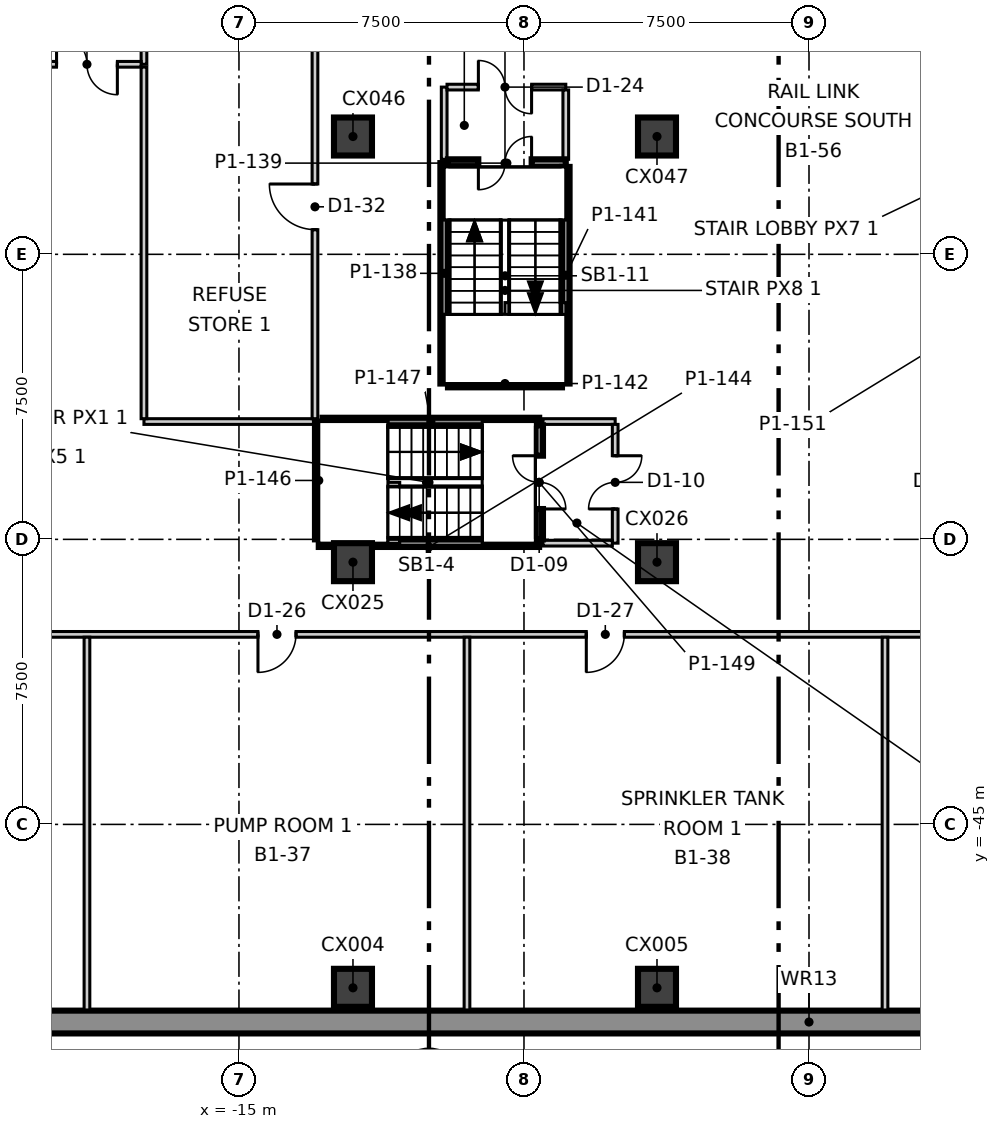
"""IFC4 building model, lengths in metres.
Left out: names, types, materials, properties, quantities, classifications, styles, units other than length and angle.
Written with IfcOpenShell. Run it as: python <this file> out.ifc"""

import sys

from ifc_helpers import new_model, si_unit, direction, frame, frame_2d, origin, origin_2d, place, context, subcontext, project, spatial, rectangle, extrude, element, fill, save


model = new_model("IFC4")
c1 = context("Model", 3, precision=1e-05, world=origin(), true_north=direction((0.0, 1.0)))
c2 = subcontext(c1, "Body", "Model", "MODEL_VIEW")
j1 = project(units=[si_unit("LENGTHUNIT", "METRE"), si_unit("PLANEANGLEUNIT", "RADIAN")], contexts=[c1])
p1 = place(None, origin())
s1 = spatial("IfcSite", under=j1, at=p1, CompositionType="ELEMENT")
p2 = place(p1, origin())
s2 = spatial("IfcBuilding", under=s1, at=p2, CompositionType="ELEMENT")
p3 = place(p2, frame((0.0, 0.0, -5.5)))
s3 = spatial("IfcBuildingStorey", under=s2, at=p3, CompositionType="ELEMENT", Elevation=-5.5)
p4 = place(p3, frame((-39.7, -50.2, -0.4), z_axis=(0.0, 0.0, 1.0), x_axis=(1.0, 0.0, 0.0)))
e1 = element("IfcWall", 1, at=p4, inside=s3, PredefinedType="SOLIDWALL", context=c2, shape_type="SweptSolid", body=[
    extrude(rectangle(XDim=79.4, YDim=0.6, at=frame_2d((39.7, 0.0))), origin(), (0.0, 0.0, 1.0), 5.5),
])
for number, where, z_axis, x_axis in (
    (2, (-12.0, -49.3, -0.4), (0.0, 0.0, 1.0), (1.0, 0.0, 0.0)),
    (3, (-4.0, -49.3, -0.4), (0.0, 0.0, 1.0), (1.0, 0.0, 0.0)),
    (4, (-12.0, -38.1, -0.4), (0.0, 0.0, 1.0), (1.0, 0.0, 0.0)),
    (5, (-4.0, -38.1, -0.4), (0.0, 0.0, 1.0), (1.0, 0.0, 0.0)),
    (6, (-12.0, -26.9, -0.4), (0.0, 0.0, 1.0), (1.0, 0.0, 0.0)),
    (7, (-4.0, -26.9, -0.4), (0.0, 0.0, 1.0), (1.0, 0.0, 0.0)),
):
    element("IfcColumn", number, at=place(p3, frame(where, z_axis=z_axis, x_axis=x_axis)), inside=s3, PredefinedType="COLUMN", context=c2, shape_type="SweptSolid", body=[
        extrude(rectangle(XDim=1.0, YDim=1.0, at=origin_2d()), origin(), (0.0, 0.0, 1.0), 5.5),
    ])
p5 = place(p3, frame((-39.4, -40.0, 0.0), z_axis=(0.0, 0.0, 1.0), x_axis=(1.0, 0.0, 0.0)))
e8 = element("IfcWall", 8, at=p5, inside=s3, PredefinedType="PARTITIONING", context=c2, shape_type="SweptSolid", body=[
    extrude(rectangle(XDim=78.8, YDim=0.15, at=frame_2d((39.4, 0.0))), origin(), (0.0, 0.0, 1.0), 5.1),
])
p6 = place(p5, frame((9.6, 0.0, 0.0)))
e9 = element("IfcOpeningElement", 9, at=p6, cuts=e8, PredefinedType="OPENING", context=c2, shape_type="SweptSolid", body=[
    extrude(rectangle(XDim=1.2, YDim=2.1, at=frame_2d((0.6, 1.05))), frame((0.0, 0.085, 0.0), z_axis=(0.0, -1.0, 0.0), x_axis=(1.0, 0.0, 0.0)), (0.0, 0.0, 1.0), 0.17),
])
p7 = place(p5, frame((24.9, 0.0, 0.0)))
e10 = element("IfcOpeningElement", 10, at=p7, cuts=e8, PredefinedType="OPENING", context=c2, shape_type="SweptSolid", body=[
    extrude(rectangle(XDim=1.0, YDim=2.1, at=frame_2d((0.5, 1.05))), frame((0.0, 0.085, 0.0), z_axis=(0.0, -1.0, 0.0), x_axis=(1.0, 0.0, 0.0)), (0.0, 0.0, 1.0), 0.17),
])
p8 = place(p5, frame((33.54, 0.0, 0.0)))
e11 = element("IfcOpeningElement", 11, at=p8, cuts=e8, PredefinedType="OPENING", context=c2, shape_type="SweptSolid", body=[
    extrude(rectangle(XDim=1.0, YDim=2.1, at=frame_2d((0.5, 1.05))), frame((0.0, 0.085, 0.0), z_axis=(0.0, -1.0, 0.0), x_axis=(1.0, 0.0, 0.0)), (0.0, 0.0, 1.0), 0.17),
])
p9 = place(p5, frame((44.4, 0.0, 0.0)))
e12 = element("IfcOpeningElement", 12, at=p9, cuts=e8, PredefinedType="OPENING", context=c2, shape_type="SweptSolid", body=[
    extrude(rectangle(XDim=1.0, YDim=2.1, at=frame_2d((0.5, 1.05))), frame((0.0, 0.085, 0.0), z_axis=(0.0, -1.0, 0.0), x_axis=(1.0, 0.0, 0.0)), (0.0, 0.0, 1.0), 0.17),
])
p10 = place(p5, frame((53.9, 0.0, 0.0)))
e13 = element("IfcOpeningElement", 13, at=p10, cuts=e8, PredefinedType="OPENING", context=c2, shape_type="SweptSolid", body=[
    extrude(rectangle(XDim=1.0, YDim=2.1, at=frame_2d((0.5, 1.05))), frame((0.0, 0.085, 0.0), z_axis=(0.0, -1.0, 0.0), x_axis=(1.0, 0.0, 0.0)), (0.0, 0.0, 1.0), 0.17),
])
p11 = place(p5, frame((65.7, 0.0, 0.0)))
e14 = element("IfcOpeningElement", 14, at=p11, cuts=e8, PredefinedType="OPENING", context=c2, shape_type="SweptSolid", body=[
    extrude(rectangle(XDim=1.2, YDim=2.1, at=frame_2d((0.6, 1.05))), frame((0.0, 0.085, 0.0), z_axis=(0.0, -1.0, 0.0), x_axis=(1.0, 0.0, 0.0)), (0.0, 0.0, 1.0), 0.17),
])
p12 = place(p3, frame((-19.0, -49.9, 0.0), z_axis=(0.0, 0.0, 1.0), x_axis=(0.0, 1.0, 0.0)))
e15 = element("IfcWall", 15, at=p12, inside=s3, PredefinedType="PARTITIONING", context=c2, shape_type="SweptSolid", body=[
    extrude(rectangle(XDim=9.825, YDim=0.15, at=frame_2d((4.913, 0.0))), origin(), (0.0, 0.0, 1.0), 5.1),
])
p13 = place(p3, frame((-9.6, -27.5, 0.0), z_axis=(0.0, 0.0, 1.0), x_axis=(0.0, 1.0, 0.0)))
e16 = element("IfcWall", 16, at=p13, inside=s3, PredefinedType="PARTITIONING", context=c2, shape_type="SweptSolid", body=[
    extrude(rectangle(XDim=1.9, YDim=0.15, at=frame_2d((0.95, 0.0))), origin(), (0.0, 0.0, 1.0), 5.1),
])
p14 = place(p3, frame((-9.525, -25.6, 0.0), z_axis=(0.0, 0.0, 1.0), x_axis=(1.0, 0.0, 0.0)))
e17 = element("IfcWall", 17, at=p14, inside=s3, PredefinedType="PARTITIONING", context=c2, shape_type="SweptSolid", body=[
    extrude(rectangle(XDim=3.125, YDim=0.15, at=frame_2d((1.562, 0.0))), origin(), (0.0, 0.0, 1.0), 5.1),
])
p15 = place(p14, frame((0.825, 0.0, 0.0)))
e18 = element("IfcOpeningElement", 18, at=p15, cuts=e17, PredefinedType="OPENING", context=c2, shape_type="SweptSolid", body=[
    extrude(rectangle(XDim=1.4, YDim=2.1, at=frame_2d((0.7, 1.05))), frame((0.0, 0.085, 0.0), z_axis=(0.0, -1.0, 0.0), x_axis=(1.0, 0.0, 0.0)), (0.0, 0.0, 1.0), 0.17),
])
p16 = place(p3, frame((-6.4, -27.5, 0.0), z_axis=(0.0, 0.0, 1.0), x_axis=(0.0, 1.0, 0.0)))
e19 = element("IfcWall", 19, at=p16, inside=s3, PredefinedType="PARTITIONING", context=c2, shape_type="SweptSolid", body=[
    extrude(rectangle(XDim=1.825, YDim=0.15, at=frame_2d((0.913, 0.0))), origin(), (0.0, 0.0, 1.0), 5.1),
])
p17 = place(p3, frame((-9.0, -49.9, 0.0), z_axis=(0.0, 0.0, 1.0), x_axis=(0.0, 1.0, 0.0)))
e20 = element("IfcWall", 20, at=p17, inside=s3, PredefinedType="PARTITIONING", context=c2, shape_type="SweptSolid", body=[
    extrude(rectangle(XDim=9.825, YDim=0.15, at=frame_2d((4.913, 0.0))), origin(), (0.0, 0.0, 1.0), 5.1),
])
p18 = place(p3, frame((-7.0, -34.4, 0.0), z_axis=(0.0, 0.0, 1.0), x_axis=(1.0, 0.0, 0.0)))
e21 = element("IfcWall", 21, at=p18, inside=s3, PredefinedType="PARTITIONING", context=c2, shape_type="SweptSolid", body=[
    extrude(rectangle(XDim=1.9, YDim=0.15, at=frame_2d((0.95, 0.0))), origin(), (0.0, 0.0, 1.0), 5.1),
])
p19 = place(p3, frame((-5.1, -37.6, 0.0), z_axis=(0.0, 0.0, 1.0), x_axis=(0.0, 1.0, 0.0)))
e22 = element("IfcWall", 22, at=p19, inside=s3, PredefinedType="PARTITIONING", context=c2, shape_type="SweptSolid", body=[
    extrude(rectangle(XDim=3.125, YDim=0.15, at=frame_2d((1.562, 0.0))), origin(), (0.0, 0.0, 1.0), 5.1),
])
p20 = place(p19, frame((0.9, 0.0, 0.0)))
e23 = element("IfcOpeningElement", 23, at=p20, cuts=e22, PredefinedType="OPENING", context=c2, shape_type="SweptSolid", body=[
    extrude(rectangle(XDim=1.4, YDim=2.1, at=frame_2d((0.7, 1.05))), frame((0.0, 0.085, 0.0), z_axis=(0.0, -1.0, 0.0), x_axis=(1.0, 0.0, 0.0)), (0.0, 0.0, 1.0), 0.17),
])
p21 = place(p3, frame((-7.0, -37.6, 0.0), z_axis=(0.0, 0.0, 1.0), x_axis=(1.0, 0.0, 0.0)))
e24 = element("IfcWall", 24, at=p21, inside=s3, PredefinedType="PARTITIONING", context=c2, shape_type="SweptSolid", body=[
    extrude(rectangle(XDim=1.825, YDim=0.15, at=frame_2d((0.913, 0.0))), origin(), (0.0, 0.0, 1.0), 5.1),
])
p22 = place(p3, frame((2.0, -49.9, 0.0), z_axis=(0.0, 0.0, 1.0), x_axis=(0.0, 1.0, 0.0)))
e25 = element("IfcWall", 25, at=p22, inside=s3, PredefinedType="PARTITIONING", context=c2, shape_type="SweptSolid", body=[
    extrude(rectangle(XDim=9.825, YDim=0.15, at=frame_2d((4.913, 0.0))), origin(), (0.0, 0.0, 1.0), 5.1),
])
p23 = place(p3, frame((-17.5, -25.0, 0.0), z_axis=(0.0, 0.0, 1.0), x_axis=(0.0, 1.0, 0.0)))
e26 = element("IfcWall", 26, at=p23, inside=s3, PredefinedType="PARTITIONING", context=c2, shape_type="SweptSolid", body=[
    extrude(rectangle(XDim=4.925, YDim=0.15, at=frame_2d((2.462, 0.0))), origin(), (0.0, 0.0, 1.0), 5.1),
])
p24 = place(p3, frame((-20.5, -25.0, 0.0), z_axis=(0.0, 0.0, 1.0), x_axis=(1.0, 0.0, 0.0)))
e27 = element("IfcWall", 27, at=p24, inside=s3, PredefinedType="PARTITIONING", context=c2, shape_type="SweptSolid", body=[
    extrude(rectangle(XDim=2.925, YDim=0.15, at=frame_2d((1.462, 0.0))), origin(), (0.0, 0.0, 1.0), 5.1),
])
p25 = place(p24, frame((0.7, 0.0, 0.0)))
e28 = element("IfcOpeningElement", 28, at=p25, cuts=e27, PredefinedType="OPENING", context=c2, shape_type="SweptSolid", body=[
    extrude(rectangle(XDim=1.6, YDim=2.1, at=frame_2d((0.8, 1.05))), frame((0.0, 0.085, 0.0), z_axis=(0.0, -1.0, 0.0), x_axis=(1.0, 0.0, 0.0)), (0.0, 0.0, 1.0), 0.17),
])
p26 = place(p3, frame((-17.5, -34.4, 0.0), z_axis=(0.0, 0.0, 1.0), x_axis=(1.0, 0.0, 0.0)))
e29 = element("IfcWall", 29, at=p26, inside=s3, PredefinedType="PARTITIONING", context=c2, shape_type="SweptSolid", body=[
    extrude(rectangle(XDim=4.5, YDim=0.15, at=frame_2d((2.25, 0.0))), origin(), (0.0, 0.0, 1.0), 5.1),
])
p27 = place(p3, frame((-13.0, -34.325, 0.0), z_axis=(0.0, 0.0, 1.0), x_axis=(0.0, 1.0, 0.0)))
e30 = element("IfcWall", 30, at=p27, inside=s3, PredefinedType="PARTITIONING", context=c2, shape_type="SweptSolid", body=[
    extrude(rectangle(XDim=11.15, YDim=0.15, at=frame_2d((5.575, 0.0))), origin(), (0.0, 0.0, 1.0), 5.1),
])
p28 = place(p27, frame((4.975, 0.0, 0.0)))
e31 = element("IfcOpeningElement", 31, at=p28, cuts=e30, PredefinedType="OPENING", context=c2, shape_type="SweptSolid", body=[
    extrude(rectangle(XDim=1.2, YDim=2.1, at=frame_2d((0.6, 1.05))), frame((0.0, 0.085, 0.0), z_axis=(0.0, -1.0, 0.0), x_axis=(1.0, 0.0, 0.0)), (0.0, 0.0, 1.0), 0.17),
])
p29 = place(p3, frame((-17.5, -34.325, 0.0), z_axis=(0.0, 0.0, 1.0), x_axis=(0.0, 1.0, 0.0)))
e32 = element("IfcWall", 32, at=p29, inside=s3, PredefinedType="PARTITIONING", context=c2, shape_type="SweptSolid", body=[
    extrude(rectangle(XDim=9.252, YDim=0.15, at=frame_2d((4.626, 0.0))), origin(), (0.0, 0.0, 1.0), 5.1),
])
p30 = place(p3, frame((-9.6, -33.4, 0.0), z_axis=(0.0, 0.0, 1.0), x_axis=(0.0, 1.0, 0.0)))
e33 = element("IfcWall", 33, at=p30, inside=s3, PredefinedType="SOLIDWALL", context=c2, shape_type="SweptSolid", body=[
    extrude(rectangle(XDim=5.8, YDim=0.2, at=frame_2d((2.9, 0.0))), origin(), (0.0, 0.0, 1.0), 5.1),
])
p31 = place(p3, frame((-9.5, -27.6, 0.0), z_axis=(0.0, 0.0, 1.0), x_axis=(1.0, 0.0, 0.0)))
e34 = element("IfcWall", 34, at=p31, inside=s3, PredefinedType="SOLIDWALL", context=c2, shape_type="SweptSolid", body=[
    extrude(rectangle(XDim=3.1, YDim=0.2, at=frame_2d((1.55, 0.0))), origin(), (0.0, 0.0, 1.0), 5.1),
])
p32 = place(p31, frame((0.8, 0.0, 0.0)))
e35 = element("IfcOpeningElement", 35, at=p32, cuts=e34, PredefinedType="OPENING", context=c2, shape_type="SweptSolid", body=[
    extrude(rectangle(XDim=1.4, YDim=2.1, at=frame_2d((0.7, 1.05))), frame((0.0, 0.11, 0.0), z_axis=(0.0, -1.0, 0.0), x_axis=(1.0, 0.0, 0.0)), (0.0, 0.0, 1.0), 0.22),
])
p33 = place(p3, frame((-6.4, -33.4, 0.0), z_axis=(0.0, 0.0, 1.0), x_axis=(0.0, 1.0, 0.0)))
e36 = element("IfcWall", 36, at=p33, inside=s3, PredefinedType="SOLIDWALL", context=c2, shape_type="SweptSolid", body=[
    extrude(rectangle(XDim=5.7, YDim=0.2, at=frame_2d((2.85, 0.0))), origin(), (0.0, 0.0, 1.0), 5.1),
])
p34 = place(p3, frame((-9.5, -33.4, 0.0), z_axis=(0.0, 0.0, 1.0), x_axis=(1.0, 0.0, 0.0)))
e37 = element("IfcWall", 37, at=p34, inside=s3, PredefinedType="SOLIDWALL", context=c2, shape_type="SweptSolid", body=[
    extrude(rectangle(XDim=3.0, YDim=0.2, at=frame_2d((1.5, 0.0))), origin(), (0.0, 0.0, 1.0), 5.1),
])
p35 = place(p3, frame((-12.9, -37.6, 0.0), z_axis=(0.0, 0.0, 1.0), x_axis=(1.0, 0.0, 0.0)))
e38 = element("IfcWall", 38, at=p35, inside=s3, PredefinedType="SOLIDWALL", context=c2, shape_type="SweptSolid", body=[
    extrude(rectangle(XDim=5.798, YDim=0.2, at=frame_2d((2.899, 0.0))), origin(), (0.0, 0.0, 1.0), 5.1),
])
p36 = place(p3, frame((-12.9, -37.5, 0.0), z_axis=(0.0, 0.0, 1.0), x_axis=(0.0, 1.0, 0.0)))
e39 = element("IfcWall", 39, at=p36, inside=s3, PredefinedType="SOLIDWALL", context=c2, shape_type="SweptSolid", body=[
    extrude(rectangle(XDim=3.1, YDim=0.2, at=frame_2d((1.55, 0.0))), origin(), (0.0, 0.0, 1.0), 5.1),
])
p37 = place(p3, frame((-12.8, -34.4, 0.0), z_axis=(0.0, 0.0, 1.0), x_axis=(1.0, 0.0, 0.0)))
e40 = element("IfcWall", 40, at=p37, inside=s3, PredefinedType="SOLIDWALL", context=c2, shape_type="SweptSolid", body=[
    extrude(rectangle(XDim=5.7, YDim=0.2, at=frame_2d((2.85, 0.0))), origin(), (0.0, 0.0, 1.0), 5.1),
])
p38 = place(p3, frame((-7.1, -37.5, 0.0), z_axis=(0.0, 0.0, 1.0), x_axis=(0.0, 1.0, 0.0)))
e41 = element("IfcWall", 41, at=p38, inside=s3, PredefinedType="SOLIDWALL", context=c2, shape_type="SweptSolid", body=[
    extrude(rectangle(XDim=3.0, YDim=0.2, at=frame_2d((1.5, 0.0))), origin(), (0.0, 0.0, 1.0), 5.1),
])
p39 = place(p38, frame((0.8, 0.0, 0.0)))
e42 = element("IfcOpeningElement", 42, at=p39, cuts=e41, PredefinedType="OPENING", context=c2, shape_type="SweptSolid", body=[
    extrude(rectangle(XDim=1.4, YDim=2.1, at=frame_2d((0.7, 1.05))), frame((0.0, 0.11, 0.0), z_axis=(0.0, -1.0, 0.0), x_axis=(1.0, 0.0, 0.0)), (0.0, 0.0, 1.0), 0.22),
])
p40 = place(p25, origin())
e43 = element("IfcDoor", 43, at=p40, inside=s3, OperationType="DOUBLE_DOOR_SINGLE_SWING", PredefinedType="DOOR", context=c2, shape_type="SweptSolid", body=[
    extrude(rectangle(XDim=1.6, YDim=2.1, at=frame_2d((0.8, 1.05))), frame((0.0, 0.025, 0.0), z_axis=(0.0, -1.0, 0.0), x_axis=(1.0, 0.0, 0.0)), (0.0, 0.0, 1.0), 0.05),
])
fill(e28, e43)
p41 = place(p39, origin())
e44 = element("IfcDoor", 44, at=p41, inside=s3, OperationType="DOUBLE_DOOR_SINGLE_SWING", PredefinedType="DOOR", context=c2, shape_type="SweptSolid", body=[
    extrude(rectangle(XDim=1.4, YDim=2.1, at=frame_2d((0.7, 1.05))), frame((0.0, 0.025, 0.0), z_axis=(0.0, -1.0, 0.0), x_axis=(1.0, 0.0, 0.0)), (0.0, 0.0, 1.0), 0.05),
])
fill(e42, e44)
p42 = place(p20, origin())
e45 = element("IfcDoor", 45, at=p42, inside=s3, OperationType="DOUBLE_DOOR_SINGLE_SWING", PredefinedType="DOOR", context=c2, shape_type="SweptSolid", body=[
    extrude(rectangle(XDim=1.4, YDim=2.1, at=frame_2d((0.7, 1.05))), frame((0.0, 0.025, 0.0), z_axis=(0.0, -1.0, 0.0), x_axis=(1.0, 0.0, 0.0)), (0.0, 0.0, 1.0), 0.05),
])
fill(e23, e45)
p43 = place(p32, origin())
e46 = element("IfcDoor", 46, at=p43, inside=s3, OperationType="DOUBLE_DOOR_SINGLE_SWING", PredefinedType="DOOR", context=c2, shape_type="SweptSolid", body=[
    extrude(rectangle(XDim=1.4, YDim=2.1, at=frame_2d((0.7, 1.05))), frame((0.0, 0.025, 0.0), z_axis=(0.0, -1.0, 0.0), x_axis=(1.0, 0.0, 0.0)), (0.0, 0.0, 1.0), 0.05),
])
fill(e35, e46)
p44 = place(p15, origin())
e47 = element("IfcDoor", 47, at=p44, inside=s3, OperationType="DOUBLE_DOOR_SINGLE_SWING", PredefinedType="DOOR", context=c2, shape_type="SweptSolid", body=[
    extrude(rectangle(XDim=1.4, YDim=2.1, at=frame_2d((0.7, 1.05))), frame((0.0, 0.025, 0.0), z_axis=(0.0, -1.0, 0.0), x_axis=(1.0, 0.0, 0.0)), (0.0, 0.0, 1.0), 0.05),
])
fill(e18, e47)
p45 = place(p7, origin())
e48 = element("IfcDoor", 48, at=p45, inside=s3, OperationType="SINGLE_SWING_LEFT", PredefinedType="DOOR", context=c2, shape_type="SweptSolid", body=[
    extrude(rectangle(XDim=1.0, YDim=2.1, at=frame_2d((0.5, 1.05))), frame((0.0, 0.025, 0.0), z_axis=(0.0, -1.0, 0.0), x_axis=(1.0, 0.0, 0.0)), (0.0, 0.0, 1.0), 0.05),
])
fill(e10, e48)
p46 = place(p8, origin())
e49 = element("IfcDoor", 49, at=p46, inside=s3, OperationType="SINGLE_SWING_LEFT", PredefinedType="DOOR", context=c2, shape_type="SweptSolid", body=[
    extrude(rectangle(XDim=1.0, YDim=2.1, at=frame_2d((0.5, 1.05))), frame((0.0, 0.025, 0.0), z_axis=(0.0, -1.0, 0.0), x_axis=(1.0, 0.0, 0.0)), (0.0, 0.0, 1.0), 0.05),
])
fill(e11, e49)
p47 = place(p28, origin())
e50 = element("IfcDoor", 50, at=p47, inside=s3, OperationType="SINGLE_SWING_LEFT", PredefinedType="DOOR", context=c2, shape_type="SweptSolid", body=[
    extrude(rectangle(XDim=1.2, YDim=2.1, at=frame_2d((0.6, 1.05))), frame((0.0, 0.025, 0.0), z_axis=(0.0, -1.0, 0.0), x_axis=(1.0, 0.0, 0.0)), (0.0, 0.0, 1.0), 0.05),
])
fill(e31, e50)
save(model, sys.argv[1])
